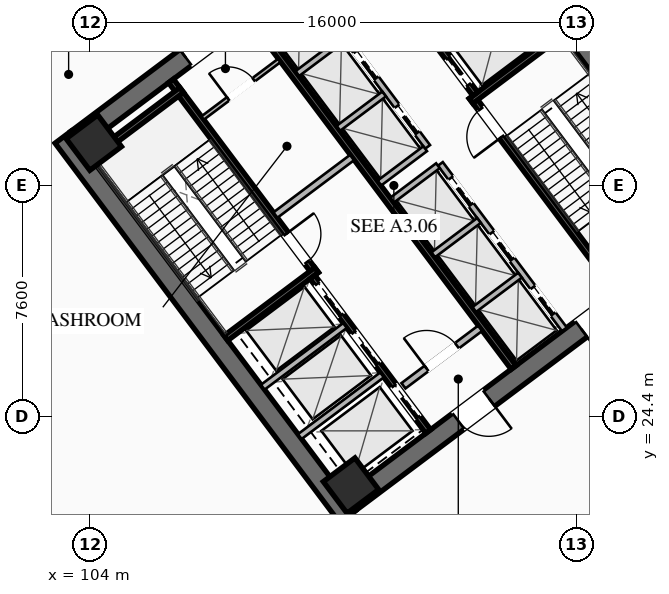
"""IFC4 building model, lengths in metres.
Left out: names, types, materials, properties, quantities, classifications, styles, units other than length and angle.
Written with IfcOpenShell. Run it as: python <this file> out.ifc"""

import sys

from ifc_helpers import new_model, si_unit, direction, frame, frame_2d, origin, origin_2d, place, context, subcontext, project, spatial, rectangle, hollow_rectangle, extrude, element, fill, save


model = new_model("IFC4")
c1 = context("Model", 3, precision=1e-05, world=origin(), true_north=direction((0.0, 1.0)))
c2 = subcontext(c1, "Body", "Model", "MODEL_VIEW")
j1 = project(units=[si_unit("LENGTHUNIT", "METRE"), si_unit("PLANEANGLEUNIT", "RADIAN")], contexts=[c1])
p1 = place(None, origin())
s1 = spatial("IfcSite", under=j1, at=p1, CompositionType="ELEMENT")
p2 = place(p1, origin())
s2 = spatial("IfcBuilding", under=s1, at=p2, CompositionType="ELEMENT")
p3 = place(p2, origin())
s3 = spatial("IfcBuildingStorey", under=s2, at=p3, CompositionType="ELEMENT", Elevation=0.0)
for number, where, z_axis, x_axis in (
    (1, (112.476, 21.107, 0.0), (0.0, 0.0, 1.0), (-0.6, 0.8, 0.0)),
    (2, (115.524, 42.893, 0.0), (0.0, 0.0, 1.0), (0.6, -0.8, 0.0)),
):
    element("IfcWall", number, at=place(p3, frame(where, z_axis=z_axis, x_axis=x_axis)), inside=s3, PredefinedType="SHEAR", context=c2, shape_type="SweptSolid", body=[
        extrude(rectangle(XDim=15.6, YDim=0.65, at=frame_2d((7.8, 0.0))), origin(), (0.0, 0.0, 1.0), 5.4),
    ])
p4 = place(p3, frame((124.429, 30.478, 0.0), z_axis=(0.0, 0.0, 1.0), x_axis=(-0.799998028465, -0.600002628705, 0.0)))
e3 = element("IfcWall", 3, at=p4, inside=s3, PredefinedType="SHEAR", context=c2, shape_type="SweptSolid", body=[
    extrude(rectangle(XDim=14.86, YDim=0.65, at=frame_2d((7.43, 0.0))), origin(), (0.0, 0.0, 1.0), 5.4),
])
p5 = place(p4, frame((9.13, 0.0, 0.0)))
e4 = element("IfcOpeningElement", 4, at=p5, cuts=e3, PredefinedType="OPENING", context=c2, shape_type="SweptSolid", body=[
    extrude(rectangle(XDim=1.25, YDim=2.25, at=frame_2d((0.625, 1.125))), frame((0.0, 0.335, 0.0), z_axis=(0.0, -1.0, 0.0), x_axis=(1.0, 0.0, 0.0)), (0.0, 0.0, 1.0), 0.67),
])
p6 = place(p4, frame((4.08, 0.0, 0.0)))
e5 = element("IfcOpeningElement", 5, at=p6, cuts=e3, PredefinedType="OPENING", context=c2, shape_type="SweptSolid", body=[
    extrude(rectangle(XDim=1.25, YDim=2.25, at=frame_2d((0.625, 1.125))), frame((0.0, 0.335, 0.0), z_axis=(0.0, -1.0, 0.0), x_axis=(1.0, 0.0, 0.0)), (0.0, 0.0, 1.0), 0.67),
])
p7 = place(p3, frame((103.571, 33.522, 0.0), z_axis=(0.0, 0.0, 1.0), x_axis=(0.799998028465, 0.600002628705, 0.0)))
e6 = element("IfcWall", 6, at=p7, inside=s3, PredefinedType="SHEAR", context=c2, shape_type="SweptSolid", body=[
    extrude(rectangle(XDim=14.86, YDim=0.65, at=frame_2d((7.43, 0.0))), origin(), (0.0, 0.0, 1.0), 5.4),
])
p8 = place(p7, frame((4.48, 0.0, 0.0)))
e7 = element("IfcOpeningElement", 7, at=p8, cuts=e6, PredefinedType="OPENING", context=c2, shape_type="SweptSolid", body=[
    extrude(rectangle(XDim=1.25, YDim=2.25, at=frame_2d((0.625, 1.125))), frame((0.0, 0.335, 0.0), z_axis=(0.0, -1.0, 0.0), x_axis=(1.0, 0.0, 0.0)), (0.0, 0.0, 1.0), 0.67),
])
p9 = place(p7, frame((9.53, 0.0, 0.0)))
e8 = element("IfcOpeningElement", 8, at=p9, cuts=e6, PredefinedType="OPENING", context=c2, shape_type="SweptSolid", body=[
    extrude(rectangle(XDim=1.25, YDim=2.25, at=frame_2d((0.625, 1.125))), frame((0.0, 0.335, 0.0), z_axis=(0.0, -1.0, 0.0), x_axis=(1.0, 0.0, 0.0)), (0.0, 0.0, 1.0), 0.67),
])
for number, where, z_axis, x_axis in (
    (9, (112.59, 22.13, 0.0), (0.0, 0.0, 1.0), (0.8, 0.6, 0.0)),
    (10, (104.13, 33.41, 0.0), (0.0, 0.0, 1.0), (0.8, 0.6, 0.0)),
):
    element("IfcColumn", number, at=place(p3, frame(where, z_axis=z_axis, x_axis=x_axis)), inside=s3, PredefinedType="COLUMN", context=c2, shape_type="SweptSolid", body=[
        extrude(hollow_rectangle(XDim=1.3, YDim=1.3, WallThickness=0.05, at=origin_2d()), origin(), (0.0, 0.0, 1.0), 5.14),
    ])
p10 = place(p3, frame((106.67, 35.44, 0.0), z_axis=(0.0, 0.0, 1.0), x_axis=(0.600009827119, -0.799992629566, 0.0)))
e11 = element("IfcWall", 11, at=p10, inside=s3, PredefinedType="SHEAR", context=c2, shape_type="SweptSolid", body=[
    extrude(rectangle(XDim=7.95, YDim=0.2, at=frame_2d((3.975, 0.0))), origin(), (0.0, 0.0, 1.0), 5.14),
])
p11 = place(p10, frame((6.3, 0.0, 0.0)))
e12 = element("IfcOpeningElement", 12, at=p11, cuts=e11, PredefinedType="OPENING", context=c2, shape_type="SweptSolid", body=[
    extrude(rectangle(XDim=1.15, YDim=2.2, at=frame_2d((0.575, 1.1))), frame((0.0, 0.11, 0.0), z_axis=(0.0, -1.0, 0.0), x_axis=(1.0, 0.0, 0.0)), (0.0, 0.0, 1.0), 0.22),
])
for number, where, z_axis, x_axis in (
    (13, (108.476, 26.982, 0.0), (0.0, 0.0, 1.0), (0.8, 0.6, 0.0)),
    (14, (104.036, 32.902, 0.0), (0.0, 0.0, 1.0), (0.8, 0.6, 0.0)),
):
    element("IfcWall", number, at=place(p3, frame(where, z_axis=z_axis, x_axis=x_axis)), inside=s3, PredefinedType="SHEAR", context=c2, shape_type="SweptSolid", body=[
        extrude(rectangle(XDim=3.73, YDim=0.2, at=frame_2d((1.865, 0.0))), origin(), (0.0, 0.0, 1.0), 5.14),
    ])
p12 = place(p3, frame((121.33, 28.56, 0.0), z_axis=(0.0, 0.0, 1.0), x_axis=(-0.600009827119, 0.799992629566, 0.0)))
e15 = element("IfcWall", 15, at=p12, inside=s3, PredefinedType="SHEAR", context=c2, shape_type="SweptSolid", body=[
    extrude(rectangle(XDim=7.95, YDim=0.2, at=frame_2d((3.975, 0.0))), origin(), (0.0, 0.0, 1.0), 5.14),
])
p13 = place(p12, frame((6.3, 0.0, 0.0)))
e16 = element("IfcOpeningElement", 16, at=p13, cuts=e15, PredefinedType="OPENING", context=c2, shape_type="SweptSolid", body=[
    extrude(rectangle(XDim=1.15, YDim=2.2, at=frame_2d((0.575, 1.1))), frame((0.0, 0.11, 0.0), z_axis=(0.0, -1.0, 0.0), x_axis=(1.0, 0.0, 0.0)), (0.0, 0.0, 1.0), 0.22),
])
p14 = place(p3, frame((116.54, 34.78, 0.0), z_axis=(0.0, 0.0, 1.0), x_axis=(0.799984290658, 0.600020945218, 0.0)))
e17 = element("IfcWall", 17, at=p14, inside=s3, PredefinedType="SHEAR", context=c2, shape_type="SweptSolid", body=[
    extrude(rectangle(XDim=3.73, YDim=0.2, at=frame_2d((1.865, 0.0))), origin(), (0.0, 0.0, 1.0), 5.14),
])
p15 = place(p3, frame((117.938, 26.016, 0.0), z_axis=(0.0, 0.0, 1.0), x_axis=(-0.600005463273, 0.799995902516, 0.0)))
e18 = element("IfcWall", 18, at=p15, inside=s3, PredefinedType="SHEAR", context=c2, shape_type="SweptSolid", body=[
    extrude(rectangle(XDim=14.3, YDim=0.2, at=frame_2d((7.15, 0.0))), origin(), (0.0, 0.0, 1.0), 5.14),
])
p16 = place(p3, frame((110.104, 31.028, 0.0), z_axis=(0.0, 0.0, 1.0), x_axis=(0.800018601094, 0.59997519774, 0.0)))
e19 = element("IfcWall", 19, at=p16, inside=s3, PredefinedType="SOLIDWALL", context=c2, shape_type="SweptSolid", body=[
    extrude(rectangle(XDim=3.15, YDim=0.22, at=frame_2d((1.575, 0.0))), origin(), (0.0, 0.0, 1.0), 3.31),
])
p17 = place(p3, frame((114.316, 25.412, 0.0), z_axis=(0.0, 0.0, 1.0), x_axis=(0.800018601094, 0.59997519774, 0.0)))
e20 = element("IfcWall", 20, at=p17, inside=s3, PredefinedType="SOLIDWALL", context=c2, shape_type="SweptSolid", body=[
    extrude(rectangle(XDim=3.15, YDim=0.22, at=frame_2d((1.575, 0.0))), origin(), (0.0, 0.0, 1.0), 3.31),
])
p18 = place(p17, frame((0.95, 0.0, 0.0)))
e21 = element("IfcOpeningElement", 21, at=p18, cuts=e20, PredefinedType="OPENING", context=c2, shape_type="SweptSolid", body=[
    extrude(rectangle(XDim=1.25, YDim=2.25, at=frame_2d((0.625, 1.125))), frame((0.0, 0.12, 0.0), z_axis=(0.0, -1.0, 0.0), x_axis=(1.0, 0.0, 0.0)), (0.0, 0.0, 1.0), 0.24),
])
p19 = place(p3, frame((115.13, 23.91, 0.0), z_axis=(0.0, 0.0, 1.0), x_axis=(-0.599975393228, 0.800018454488, 0.0)))
e22 = element("IfcWall", 22, at=p19, inside=s3, PredefinedType="SHEAR", context=c2, shape_type="SweptSolid", body=[
    extrude(rectangle(XDim=6.35, YDim=0.2, at=frame_2d((3.175, 0.0))), origin(), (0.0, 0.0, 1.0), 5.14),
])
p20 = place(p19, frame((4.775, 0.0, 0.0)))
e23 = element("IfcOpeningElement", 23, at=p20, cuts=e22, PredefinedType="OPENING", context=c2, shape_type="SweptSolid", body=[
    extrude(rectangle(XDim=1.3, YDim=2.25, at=frame_2d((0.65, 1.125))), frame((0.0, 0.11, 0.0), z_axis=(0.0, -1.0, 0.0), x_axis=(1.0, 0.0, 0.0)), (0.0, 0.0, 1.0), 0.22),
])
p21 = place(p19, frame((2.775, 0.0, 0.0)))
e24 = element("IfcOpeningElement", 24, at=p21, cuts=e22, PredefinedType="OPENING", context=c2, shape_type="SweptSolid", body=[
    extrude(rectangle(XDim=1.3, YDim=2.25, at=frame_2d((0.65, 1.125))), frame((0.0, 0.11, 0.0), z_axis=(0.0, -1.0, 0.0), x_axis=(1.0, 0.0, 0.0)), (0.0, 0.0, 1.0), 0.22),
])
p22 = place(p19, frame((0.575, 0.0, 0.0)))
e25 = element("IfcOpeningElement", 25, at=p22, cuts=e22, PredefinedType="OPENING", context=c2, shape_type="SweptSolid", body=[
    extrude(rectangle(XDim=1.3, YDim=2.25, at=frame_2d((0.65, 1.125))), frame((0.0, 0.11, 0.0), z_axis=(0.0, -1.0, 0.0), x_axis=(1.0, 0.0, 0.0)), (0.0, 0.0, 1.0), 0.22),
])
for number, where, z_axis, x_axis in (
    (26, (110.906, 23.742, 0.0), (0.0, 0.0, 1.0), (0.8, 0.6, 0.0)),
    (27, (109.688, 25.366, 0.0), (0.0, 0.0, 1.0), (0.8, 0.6, 0.0)),
):
    element("IfcWall", number, at=place(p3, frame(where, z_axis=z_axis, x_axis=x_axis)), inside=s3, PredefinedType="SOLIDWALL", context=c2, shape_type="SweptSolid", body=[
        extrude(rectangle(XDim=3.38, YDim=0.2, at=frame_2d((1.69, 0.0))), origin(), (0.0, 0.0, 1.0), 5.14),
    ])
p23 = place(p3, frame((112.87, 40.09, 0.0), z_axis=(0.0, 0.0, 1.0), x_axis=(0.599975393228, -0.800018454488, 0.0)))
e28 = element("IfcWall", 28, at=p23, inside=s3, PredefinedType="SHEAR", context=c2, shape_type="SweptSolid", body=[
    extrude(rectangle(XDim=6.35, YDim=0.2, at=frame_2d((3.175, 0.0))), origin(), (0.0, 0.0, 1.0), 5.14),
])
p24 = place(p23, frame((4.875, 0.0, 0.0)))
e29 = element("IfcOpeningElement", 29, at=p24, cuts=e28, PredefinedType="OPENING", context=c2, shape_type="SweptSolid", body=[
    extrude(rectangle(XDim=1.1, YDim=2.2, at=frame_2d((0.55, 1.1))), frame((0.0, 0.11, 0.0), z_axis=(0.0, -1.0, 0.0), x_axis=(1.0, 0.0, 0.0)), (0.0, 0.0, 1.0), 0.22),
])
p25 = place(p23, frame((2.825, 0.0, 0.0)))
e30 = element("IfcOpeningElement", 30, at=p25, cuts=e28, PredefinedType="OPENING", context=c2, shape_type="SweptSolid", body=[
    extrude(rectangle(XDim=1.1, YDim=2.2, at=frame_2d((0.55, 1.1))), frame((0.0, 0.11, 0.0), z_axis=(0.0, -1.0, 0.0), x_axis=(1.0, 0.0, 0.0)), (0.0, 0.0, 1.0), 0.22),
])
p26 = place(p23, frame((0.825, 0.0, 0.0)))
e31 = element("IfcOpeningElement", 31, at=p26, cuts=e28, PredefinedType="OPENING", context=c2, shape_type="SweptSolid", body=[
    extrude(rectangle(XDim=1.1, YDim=2.2, at=frame_2d((0.55, 1.1))), frame((0.0, 0.11, 0.0), z_axis=(0.0, -1.0, 0.0), x_axis=(1.0, 0.0, 0.0)), (0.0, 0.0, 1.0), 0.22),
])
p27 = place(p3, frame((107.71, 34.22, 0.0), z_axis=(0.0, 0.0, 1.0), x_axis=(0.799981399002, 0.60002480053, 0.0)))
e32 = element("IfcWall", 32, at=p27, inside=s3, PredefinedType="PARTITIONING", context=c2, shape_type="SweptSolid", body=[
    extrude(rectangle(XDim=3.15, YDim=0.135, at=frame_2d((1.575, 0.0))), origin(), (0.0, 0.0, 1.0), 3.31),
])
p28 = place(p27, frame((1.05, 0.0, 0.0)))
e33 = element("IfcOpeningElement", 33, at=p28, cuts=e32, PredefinedType="OPENING", context=c2, shape_type="SweptSolid", body=[
    extrude(rectangle(XDim=1.05, YDim=2.2, at=frame_2d((0.525, 1.1))), frame((0.0, 0.077, 0.0), z_axis=(0.0, -1.0, 0.0), x_axis=(1.0, 0.0, 0.0)), (0.0, 0.0, 1.0), 0.155),
])
p29 = place(p3, frame((119.61, 27.27, 0.0), z_axis=(0.0, 0.0, 1.0), x_axis=(-0.600011488909, 0.79999138319, 0.0)))
e34 = element("IfcWall", 34, at=p29, inside=s3, PredefinedType="SOLIDWALL", context=c2, shape_type="SweptSolid", body=[
    extrude(rectangle(XDim=6.8, YDim=0.2, at=frame_2d((3.4, 0.0))), origin(), (0.0, 0.0, 1.0), 5.14),
])
p30 = place(p29, frame((0.625, 0.0, 0.0)))
e35 = element("IfcOpeningElement", 35, at=p30, cuts=e34, PredefinedType="OPENING", context=c2, shape_type="SweptSolid", body=[
    extrude(rectangle(XDim=1.1, YDim=2.2, at=frame_2d((0.55, 1.1))), frame((0.0, 0.11, 0.0), z_axis=(0.0, -1.0, 0.0), x_axis=(1.0, 0.0, 0.0)), (0.0, 0.0, 1.0), 0.22),
])
p31 = place(p29, frame((2.875, 0.0, 0.0)))
e36 = element("IfcOpeningElement", 36, at=p31, cuts=e34, PredefinedType="OPENING", context=c2, shape_type="SweptSolid", body=[
    extrude(rectangle(XDim=1.1, YDim=2.2, at=frame_2d((0.55, 1.1))), frame((0.0, 0.11, 0.0), z_axis=(0.0, -1.0, 0.0), x_axis=(1.0, 0.0, 0.0)), (0.0, 0.0, 1.0), 0.22),
])
p32 = place(p29, frame((5.125, 0.0, 0.0)))
e37 = element("IfcOpeningElement", 37, at=p32, cuts=e34, PredefinedType="OPENING", context=c2, shape_type="SweptSolid", body=[
    extrude(rectangle(XDim=1.1, YDim=2.2, at=frame_2d((0.55, 1.1))), frame((0.0, 0.11, 0.0), z_axis=(0.0, -1.0, 0.0), x_axis=(1.0, 0.0, 0.0)), (0.0, 0.0, 1.0), 0.22),
])
p33 = place(p3, frame((116.646, 27.922, 0.0), z_axis=(0.0, 0.0, 1.0), x_axis=(0.8, 0.6, 0.0)))
e38 = element("IfcWall", 38, at=p33, inside=s3, PredefinedType="SOLIDWALL", context=c2, shape_type="SweptSolid", body=[
    extrude(rectangle(XDim=1.88, YDim=0.2, at=frame_2d((0.94, 0.0))), origin(), (0.0, 0.0, 1.0), 5.14),
])
p34 = place(p3, frame((115.296, 29.722, 0.0), z_axis=(0.0, 0.0, 1.0), x_axis=(0.799984418148, 0.600020775241, 0.0)))
e39 = element("IfcWall", 39, at=p34, inside=s3, PredefinedType="SOLIDWALL", context=c2, shape_type="SweptSolid", body=[
    extrude(rectangle(XDim=1.88, YDim=0.2, at=frame_2d((0.94, 0.0))), origin(), (0.0, 0.0, 1.0), 5.14),
])
p35 = place(p3, frame((113.946, 31.522, 0.0), z_axis=(0.0, 0.0, 1.0), x_axis=(0.8, 0.6, 0.0)))
e40 = element("IfcWall", 40, at=p35, inside=s3, PredefinedType="SOLIDWALL", context=c2, shape_type="SweptSolid", body=[
    extrude(rectangle(XDim=1.88, YDim=0.2, at=frame_2d((0.94, 0.0))), origin(), (0.0, 0.0, 1.0), 5.14),
])
p36 = place(p3, frame((115.11, 33.27, 0.0), z_axis=(0.0, 0.0, 1.0), x_axis=(-0.600011488909, 0.79999138319, 0.0)))
e41 = element("IfcWall", 41, at=p36, inside=s3, PredefinedType="SOLIDWALL", context=c2, shape_type="SweptSolid", body=[
    extrude(rectangle(XDim=6.8, YDim=0.2, at=frame_2d((3.4, 0.0))), origin(), (0.0, 0.0, 1.0), 5.14),
])
p37 = place(p36, frame((0.575, 0.0, 0.0)))
e42 = element("IfcOpeningElement", 42, at=p37, cuts=e41, PredefinedType="OPENING", context=c2, shape_type="SweptSolid", body=[
    extrude(rectangle(XDim=1.1, YDim=2.2, at=frame_2d((0.55, 1.1))), frame((0.0, 0.11, 0.0), z_axis=(0.0, -1.0, 0.0), x_axis=(1.0, 0.0, 0.0)), (0.0, 0.0, 1.0), 0.22),
])
p38 = place(p36, frame((2.825, 0.0, 0.0)))
e43 = element("IfcOpeningElement", 43, at=p38, cuts=e41, PredefinedType="OPENING", context=c2, shape_type="SweptSolid", body=[
    extrude(rectangle(XDim=1.1, YDim=2.2, at=frame_2d((0.55, 1.1))), frame((0.0, 0.11, 0.0), z_axis=(0.0, -1.0, 0.0), x_axis=(1.0, 0.0, 0.0)), (0.0, 0.0, 1.0), 0.22),
])
p39 = place(p36, frame((5.075, 0.0, 0.0)))
e44 = element("IfcOpeningElement", 44, at=p39, cuts=e41, PredefinedType="OPENING", context=c2, shape_type="SweptSolid", body=[
    extrude(rectangle(XDim=1.1, YDim=2.2, at=frame_2d((0.55, 1.1))), frame((0.0, 0.11, 0.0), z_axis=(0.0, -1.0, 0.0), x_axis=(1.0, 0.0, 0.0)), (0.0, 0.0, 1.0), 0.22),
])
p40 = place(p3, frame((113.526, 32.082, 0.0), z_axis=(0.0, 0.0, 1.0), x_axis=(0.800046745961, 0.599937666993, 0.0)))
e45 = element("IfcWall", 45, at=p40, inside=s3, PredefinedType="SOLIDWALL", context=c2, shape_type="SweptSolid", body=[
    extrude(rectangle(XDim=1.88, YDim=0.2, at=frame_2d((0.94, 0.0))), origin(), (0.0, 0.0, 1.0), 5.14),
])
p41 = place(p3, frame((112.176, 33.882, 0.0), z_axis=(0.0, 0.0, 1.0), x_axis=(0.8, 0.6, 0.0)))
e46 = element("IfcWall", 46, at=p41, inside=s3, PredefinedType="SOLIDWALL", context=c2, shape_type="SweptSolid", body=[
    extrude(rectangle(XDim=1.88, YDim=0.2, at=frame_2d((0.94, 0.0))), origin(), (0.0, 0.0, 1.0), 5.14),
])
p42 = place(p3, frame((110.826, 35.682, 0.0), z_axis=(0.0, 0.0, 1.0), x_axis=(0.799984418148, 0.600020775241, 0.0)))
e47 = element("IfcWall", 47, at=p42, inside=s3, PredefinedType="SOLIDWALL", context=c2, shape_type="SweptSolid", body=[
    extrude(rectangle(XDim=1.88, YDim=0.2, at=frame_2d((0.94, 0.0))), origin(), (0.0, 0.0, 1.0), 5.14),
])
p43 = place(p8, origin())
e48 = element("IfcDoor", 48, at=p43, inside=s3, OperationType="SINGLE_SWING_LEFT", PredefinedType="DOOR", context=c2, shape_type="SweptSolid", body=[
    extrude(rectangle(XDim=1.25, YDim=2.25, at=frame_2d((0.625, 1.125))), frame((0.0, 0.025, 0.0), z_axis=(0.0, -1.0, 0.0), x_axis=(1.0, 0.0, 0.0)), (0.0, 0.0, 1.0), 0.05),
])
fill(e7, e48)
p44 = place(p5, origin())
e49 = element("IfcDoor", 49, at=p44, inside=s3, OperationType="SINGLE_SWING_LEFT", PredefinedType="DOOR", context=c2, shape_type="SweptSolid", body=[
    extrude(rectangle(XDim=1.25, YDim=2.25, at=frame_2d((0.625, 1.125))), frame((0.0, 0.025, 0.0), z_axis=(0.0, -1.0, 0.0), x_axis=(1.0, 0.0, 0.0)), (0.0, 0.0, 1.0), 0.05),
])
fill(e4, e49)
p45 = place(p6, origin())
e50 = element("IfcDoor", 50, at=p45, inside=s3, OperationType="SINGLE_SWING_RIGHT", PredefinedType="DOOR", context=c2, shape_type="SweptSolid", body=[
    extrude(rectangle(XDim=1.25, YDim=2.25, at=frame_2d((0.625, 1.125))), frame((0.0, 0.025, 0.0), z_axis=(0.0, -1.0, 0.0), x_axis=(1.0, 0.0, 0.0)), (0.0, 0.0, 1.0), 0.05),
])
fill(e5, e50)
p46 = place(p11, origin())
e51 = element("IfcDoor", 51, at=p46, inside=s3, OperationType="SINGLE_SWING_LEFT", PredefinedType="DOOR", context=c2, shape_type="SweptSolid", body=[
    extrude(rectangle(XDim=1.15, YDim=2.2, at=frame_2d((0.575, 1.1))), frame((0.0, 0.025, 0.0), z_axis=(0.0, -1.0, 0.0), x_axis=(1.0, 0.0, 0.0)), (0.0, 0.0, 1.0), 0.05),
])
fill(e12, e51)
p47 = place(p13, origin())
e52 = element("IfcDoor", 52, at=p47, inside=s3, OperationType="SINGLE_SWING_LEFT", PredefinedType="DOOR", context=c2, shape_type="SweptSolid", body=[
    extrude(rectangle(XDim=1.15, YDim=2.2, at=frame_2d((0.575, 1.1))), frame((0.0, 0.025, 0.0), z_axis=(0.0, -1.0, 0.0), x_axis=(1.0, 0.0, 0.0)), (0.0, 0.0, 1.0), 0.05),
])
fill(e16, e52)
p48 = place(p18, origin())
e53 = element("IfcDoor", 53, at=p48, inside=s3, OperationType="SINGLE_SWING_LEFT", PredefinedType="DOOR", context=c2, shape_type="SweptSolid", body=[
    extrude(rectangle(XDim=1.25, YDim=2.25, at=frame_2d((0.625, 1.125))), frame((0.0, 0.025, 0.0), z_axis=(0.0, -1.0, 0.0), x_axis=(1.0, 0.0, 0.0)), (0.0, 0.0, 1.0), 0.05),
])
fill(e21, e53)
p49 = place(p28, origin())
e54 = element("IfcDoor", 54, at=p49, inside=s3, OperationType="SINGLE_SWING_LEFT", PredefinedType="DOOR", context=c2, shape_type="SweptSolid", body=[
    extrude(rectangle(XDim=1.05, YDim=2.2, at=frame_2d((0.525, 1.1))), frame((0.0, 0.025, 0.0), z_axis=(0.0, -1.0, 0.0), x_axis=(1.0, 0.0, 0.0)), (0.0, 0.0, 1.0), 0.05),
])
fill(e33, e54)
p50 = place(p20, origin())
e55 = element("IfcDoor", 55, at=p50, inside=s3, OperationType="SLIDING_TO_LEFT", PredefinedType="DOOR", context=c2, shape_type="SweptSolid", body=[
    extrude(rectangle(XDim=1.3, YDim=2.25, at=frame_2d((0.65, 1.125))), frame((0.0, 0.025, 0.0), z_axis=(0.0, -1.0, 0.0), x_axis=(1.0, 0.0, 0.0)), (0.0, 0.0, 1.0), 0.05),
])
fill(e23, e55)
p51 = place(p21, origin())
e56 = element("IfcDoor", 56, at=p51, inside=s3, OperationType="SLIDING_TO_LEFT", PredefinedType="DOOR", context=c2, shape_type="SweptSolid", body=[
    extrude(rectangle(XDim=1.3, YDim=2.25, at=frame_2d((0.65, 1.125))), frame((0.0, 0.025, 0.0), z_axis=(0.0, -1.0, 0.0), x_axis=(1.0, 0.0, 0.0)), (0.0, 0.0, 1.0), 0.05),
])
fill(e24, e56)
p52 = place(p22, origin())
e57 = element("IfcDoor", 57, at=p52, inside=s3, OperationType="SLIDING_TO_LEFT", PredefinedType="DOOR", context=c2, shape_type="SweptSolid", body=[
    extrude(rectangle(XDim=1.3, YDim=2.25, at=frame_2d((0.65, 1.125))), frame((0.0, 0.025, 0.0), z_axis=(0.0, -1.0, 0.0), x_axis=(1.0, 0.0, 0.0)), (0.0, 0.0, 1.0), 0.05),
])
fill(e25, e57)
p53 = place(p30, origin())
e58 = element("IfcDoor", 58, at=p53, inside=s3, OperationType="SLIDING_TO_LEFT", PredefinedType="DOOR", context=c2, shape_type="SweptSolid", body=[
    extrude(rectangle(XDim=1.1, YDim=2.2, at=frame_2d((0.55, 1.1))), frame((0.0, 0.025, 0.0), z_axis=(0.0, -1.0, 0.0), x_axis=(1.0, 0.0, 0.0)), (0.0, 0.0, 1.0), 0.05),
])
fill(e35, e58)
p54 = place(p31, origin())
e59 = element("IfcDoor", 59, at=p54, inside=s3, OperationType="SLIDING_TO_LEFT", PredefinedType="DOOR", context=c2, shape_type="SweptSolid", body=[
    extrude(rectangle(XDim=1.1, YDim=2.2, at=frame_2d((0.55, 1.1))), frame((0.0, 0.025, 0.0), z_axis=(0.0, -1.0, 0.0), x_axis=(1.0, 0.0, 0.0)), (0.0, 0.0, 1.0), 0.05),
])
fill(e36, e59)
p55 = place(p32, origin())
e60 = element("IfcDoor", 60, at=p55, inside=s3, OperationType="SLIDING_TO_LEFT", PredefinedType="DOOR", context=c2, shape_type="SweptSolid", body=[
    extrude(rectangle(XDim=1.1, YDim=2.2, at=frame_2d((0.55, 1.1))), frame((0.0, 0.025, 0.0), z_axis=(0.0, -1.0, 0.0), x_axis=(1.0, 0.0, 0.0)), (0.0, 0.0, 1.0), 0.05),
])
fill(e37, e60)
p56 = place(p37, origin())
e61 = element("IfcDoor", 61, at=p56, inside=s3, OperationType="SLIDING_TO_LEFT", PredefinedType="DOOR", context=c2, shape_type="SweptSolid", body=[
    extrude(rectangle(XDim=1.1, YDim=2.2, at=frame_2d((0.55, 1.1))), frame((0.0, 0.025, 0.0), z_axis=(0.0, -1.0, 0.0), x_axis=(1.0, 0.0, 0.0)), (0.0, 0.0, 1.0), 0.05),
])
fill(e42, e61)
p57 = place(p38, origin())
e62 = element("IfcDoor", 62, at=p57, inside=s3, OperationType="SLIDING_TO_LEFT", PredefinedType="DOOR", context=c2, shape_type="SweptSolid", body=[
    extrude(rectangle(XDim=1.1, YDim=2.2, at=frame_2d((0.55, 1.1))), frame((0.0, 0.025, 0.0), z_axis=(0.0, -1.0, 0.0), x_axis=(1.0, 0.0, 0.0)), (0.0, 0.0, 1.0), 0.05),
])
fill(e43, e62)
p58 = place(p24, origin())
e63 = element("IfcDoor", 63, at=p58, inside=s3, OperationType="SLIDING_TO_LEFT", PredefinedType="DOOR", context=c2, shape_type="SweptSolid", body=[
    extrude(rectangle(XDim=1.1, YDim=2.2, at=frame_2d((0.55, 1.1))), frame((0.0, 0.025, 0.0), z_axis=(0.0, -1.0, 0.0), x_axis=(1.0, 0.0, 0.0)), (0.0, 0.0, 1.0), 0.05),
])
fill(e29, e63)
save(model, sys.argv[1])
